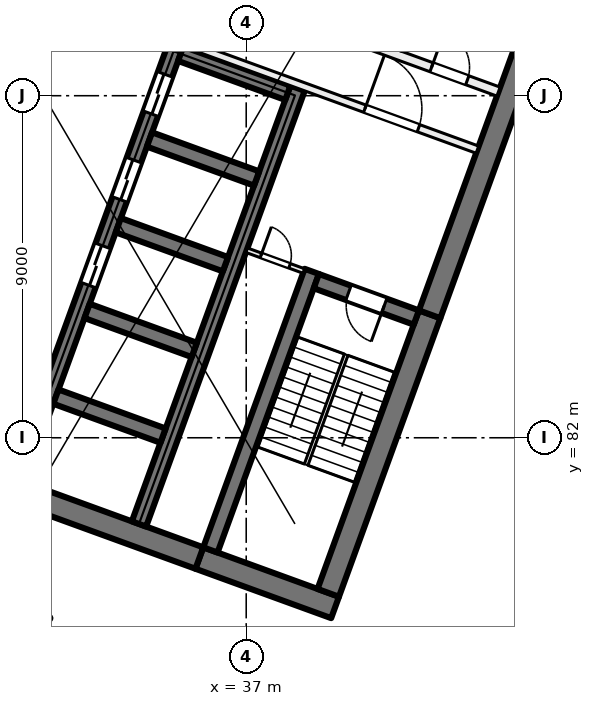
"""IFC4 building model, lengths in metres.
Left out: names, types, materials, properties, quantities, classifications, styles, units other than length and angle.
Written with IfcOpenShell. Run it as: python <this file> out.ifc"""

import sys

from ifc_helpers import new_model, si_unit, direction, frame, frame_2d, origin, place, context, subcontext, project, spatial, rectangle, extrude, element, fill, save


model = new_model("IFC4")
c1 = context("Model", 3, precision=1e-05, world=origin(), true_north=direction((0.0, 1.0)))
c2 = subcontext(c1, "Body", "Model", "MODEL_VIEW")
j1 = project(units=[si_unit("LENGTHUNIT", "METRE"), si_unit("PLANEANGLEUNIT", "RADIAN")], contexts=[c1])
p1 = place(None, origin())
s1 = spatial("IfcSite", under=j1, at=p1, CompositionType="ELEMENT")
p2 = place(p1, origin())
s2 = spatial("IfcBuilding", under=s1, at=p2, CompositionType="ELEMENT")
p3 = place(p2, frame((0.0, 0.0, 121.0)))
s3 = spatial("IfcBuildingStorey", under=s2, at=p3, CompositionType="ELEMENT", Elevation=121.0)
p4 = place(p3, frame((39.338, 77.535, 0.0), z_axis=(0.0, 0.0, 1.0), x_axis=(-0.939701471648, 0.341995824804, 0.0)))
e1 = element("IfcWall", 1, at=p4, inside=s3, PredefinedType="SHEAR", context=c2, shape_type="SweptSolid", body=[
    extrude(rectangle(XDim=3.8, YDim=0.6, at=frame_2d((1.9, 0.0))), origin(), (0.0, 0.0, 1.0), 4.0),
])
p5 = place(p3, frame((35.767, 78.835, 0.0), z_axis=(0.0, 0.0, 1.0), x_axis=(-0.939692894512, 0.342019391267, 0.0)))
e2 = element("IfcWall", 2, at=p5, inside=s3, PredefinedType="SHEAR", context=c2, shape_type="SweptSolid", body=[
    extrude(rectangle(XDim=14.4, YDim=0.6, at=frame_2d((7.2, 0.0))), origin(), (0.0, 0.0, 1.0), 4.0),
])
p6 = place(p3, frame((39.159, 77.92, 0.0), z_axis=(0.0, 0.0, 1.0), x_axis=(0.342016982193, 0.939693771338, 0.0)))
e3 = element("IfcWall", 3, at=p6, inside=s3, PredefinedType="SHEAR", context=c2, shape_type="SweptSolid", body=[
    extrude(rectangle(XDim=7.8, YDim=0.6, at=frame_2d((3.9, 0.0))), origin(), (0.0, 0.0, 1.0), 4.0),
])
p7 = place(p3, frame((41.827, 85.249, 0.0), z_axis=(0.0, 0.0, 1.0), x_axis=(0.342017595281, 0.939693548195, 0.0)))
e4 = element("IfcWall", 4, at=p7, inside=s3, PredefinedType="SHEAR", context=c2, shape_type="SweptSolid", body=[
    extrude(rectangle(XDim=8.925, YDim=0.6, at=frame_2d((4.462, 0.0))), origin(), (0.0, 0.0, 1.0), 4.0),
])
p8 = place(p3, frame((36.058, 79.048, 0.0), z_axis=(0.0, 0.0, 1.0), x_axis=(0.342016982193, 0.939693771338, 0.0)))
e5 = element("IfcWall", 5, at=p8, inside=s3, PredefinedType="SHEAR", context=c2, shape_type="SweptSolid", body=[
    extrude(rectangle(XDim=7.8, YDim=0.4, at=frame_2d((3.9, 0.0))), origin(), (0.0, 0.0, 1.0), 4.0),
])
p9 = place(p3, frame((41.476, 85.164, 0.0), z_axis=(0.0, 0.0, 1.0), x_axis=(-0.939678810556, 0.342058084236, 0.0)))
e6 = element("IfcWall", 6, at=p9, inside=s3, PredefinedType="SHEAR", context=c2, shape_type="SweptSolid", body=[
    extrude(rectangle(XDim=2.8, YDim=0.4, at=frame_2d((1.4, 0.0))), origin(), (0.0, 0.0, 1.0), 4.0),
])
p10 = place(p9, frame((0.9, 0.0, 0.0)))
e7 = element("IfcOpeningElement", 7, at=p10, cuts=e6, PredefinedType="OPENING", context=c2, shape_type="SweptSolid", body=[
    extrude(rectangle(XDim=1.0, YDim=2.1, at=frame_2d((0.5, 1.05))), frame((0.0, 0.21, 0.0), z_axis=(0.0, -1.0, 0.0), x_axis=(1.0, 0.0, 0.0)), (0.0, 0.0, 1.0), 0.42),
])
p11 = place(p3, frame((30.984, 80.895, 0.0), z_axis=(0.0, 0.0, 1.0), x_axis=(0.342021021735, 0.939692301071, 0.0)))
e8 = element("IfcWall", 8, at=p11, inside=s3, PredefinedType="SHEAR", context=c2, shape_type="SweptSolid", body=[
    extrude(rectangle(XDim=12.2, YDim=0.4, at=frame_2d((6.1, 0.0))), origin(), (0.0, 0.0, 1.0), 4.0),
])
p12 = place(p11, frame((5.45, 0.0, 0.0)))
e9 = element("IfcOpeningElement", 9, at=p12, cuts=e8, PredefinedType="OPENING", context=c2, shape_type="SweptSolid", body=[
    extrude(rectangle(XDim=1.1, YDim=2.1, at=frame_2d((0.55, 1.05))), frame((0.0, 0.21, 0.0), z_axis=(0.0, -1.0, 0.0), x_axis=(1.0, 0.0, 0.0)), (0.0, 0.0, 1.0), 0.42),
])
p13 = place(p11, frame((7.85, 0.0, 0.0)))
e10 = element("IfcOpeningElement", 10, at=p13, cuts=e8, PredefinedType="OPENING", context=c2, shape_type="SweptSolid", body=[
    extrude(rectangle(XDim=1.1, YDim=2.1, at=frame_2d((0.55, 1.05))), frame((0.0, 0.21, 0.0), z_axis=(0.0, -1.0, 0.0), x_axis=(1.0, 0.0, 0.0)), (0.0, 0.0, 1.0), 0.42),
])
p14 = place(p11, frame((10.25, 0.0, 0.0)))
e11 = element("IfcOpeningElement", 11, at=p14, cuts=e8, PredefinedType="OPENING", context=c2, shape_type="SweptSolid", body=[
    extrude(rectangle(XDim=1.1, YDim=2.1, at=frame_2d((0.55, 1.05))), frame((0.0, 0.21, 0.0), z_axis=(0.0, -1.0, 0.0), x_axis=(1.0, 0.0, 0.0)), (0.0, 0.0, 1.0), 0.42),
])
p15 = place(p3, frame((34.178, 79.732, 0.0), z_axis=(0.0, 0.0, 1.0), x_axis=(0.342014590177, 0.939694641948, 0.0)))
e12 = element("IfcWall", 12, at=p15, inside=s3, PredefinedType="SHEAR", context=c2, shape_type="SweptSolid", body=[
    extrude(rectangle(XDim=12.2, YDim=0.4, at=frame_2d((6.1, 0.0))), origin(), (0.0, 0.0, 1.0), 4.0),
])
for number, where, z_axis, x_axis in (
    (13, (34.812, 82.056, 0.0), (0.0, 0.0, 1.0), (-0.94, 0.342, 0.0)),
    (14, (35.632, 84.311, 0.0), (0.0, 0.0, 1.0), (-0.94, 0.342, 0.0)),
    (15, (36.453, 86.566, 0.0), (0.0, 0.0, 1.0), (-0.94, 0.342, 0.0)),
    (16, (37.274, 88.822, 0.0), (0.0, 0.0, 1.0), (-0.94, 0.342, 0.0)),
):
    element("IfcWall", number, at=place(p3, frame(where, z_axis=z_axis, x_axis=x_axis)), inside=s3, PredefinedType="SHEAR", context=c2, shape_type="SweptSolid", body=[
        extrude(rectangle(XDim=3.0, YDim=0.4, at=frame_2d((1.5, 0.0))), origin(), (0.0, 0.0, 1.0), 4.0),
    ])
p16 = place(p3, frame((38.095, 91.077, 0.0), z_axis=(0.0, 0.0, 1.0), x_axis=(-0.939676934218, 0.342063238742, 0.0)))
e17 = element("IfcWall", 17, at=p16, inside=s3, PredefinedType="SHEAR", context=c2, shape_type="SweptSolid", body=[
    extrude(rectangle(XDim=3.0, YDim=0.4, at=frame_2d((1.5, 0.0))), origin(), (0.0, 0.0, 1.0), 4.0),
])
p17 = place(p3, frame((35.19, 92.453, 0.0), z_axis=(0.0, 0.0, 1.0), x_axis=(0.939691552312, -0.342023078919, 0.0)))
e18 = element("IfcWall", 18, at=p17, inside=s3, PredefinedType="PARTITIONING", context=c2, shape_type="SweptSolid", body=[
    extrude(rectangle(XDim=8.4, YDim=0.2, at=frame_2d((4.2, 0.0))), origin(), (0.0, 0.0, 1.0), 3.625),
])
p18 = place(p17, frame((5.25, 0.0, 0.0)))
e19 = element("IfcOpeningElement", 19, at=p18, cuts=e18, PredefinedType="OPENING", context=c2, shape_type="SweptSolid", body=[
    extrude(rectangle(XDim=1.5, YDim=2.1, at=frame_2d((0.75, 1.05))), frame((0.0, 0.11, 0.0), z_axis=(0.0, -1.0, 0.0), x_axis=(1.0, 0.0, 0.0)), (0.0, 0.0, 1.0), 0.22),
])
p19 = place(p3, frame((35.746, 93.98, 0.0), z_axis=(0.0, 0.0, 1.0), x_axis=(0.939691552312, -0.342023078919, 0.0)))
e20 = element("IfcWall", 20, at=p19, inside=s3, PredefinedType="PARTITIONING", context=c2, shape_type="SweptSolid", body=[
    extrude(rectangle(XDim=8.4, YDim=0.25, at=frame_2d((4.2, 0.0))), origin(), (0.0, 0.0, 1.0), 3.625),
])
p20 = place(p19, frame((2.375, 0.0, 0.0)))
e21 = element("IfcOpeningElement", 21, at=p20, cuts=e20, PredefinedType="OPENING", context=c2, shape_type="SweptSolid", body=[
    extrude(rectangle(XDim=0.8, YDim=2.1, at=frame_2d((0.4, 1.05))), frame((0.0, 0.135, 0.0), z_axis=(0.0, -1.0, 0.0), x_axis=(1.0, 0.0, 0.0)), (0.0, 0.0, 1.0), 0.27),
])
p21 = place(p19, frame((6.525, 0.0, 0.0)))
e22 = element("IfcOpeningElement", 22, at=p21, cuts=e20, PredefinedType="OPENING", context=c2, shape_type="SweptSolid", body=[
    extrude(rectangle(XDim=1.0, YDim=2.1, at=frame_2d((0.5, 1.05))), frame((0.0, 0.135, 0.0), z_axis=(0.0, -1.0, 0.0), x_axis=(1.0, 0.0, 0.0)), (0.0, 0.0, 1.0), 0.27),
])
p22 = place(p3, frame((37.013, 86.935, 0.0), z_axis=(0.0, 0.0, 1.0), x_axis=(0.939659694648, -0.342110593602, 0.0)))
e23 = element("IfcWall", 23, at=p22, inside=s3, PredefinedType="PARTITIONING", context=c2, shape_type="SweptSolid", body=[
    extrude(rectangle(XDim=1.6, YDim=0.125, at=frame_2d((0.8, 0.0))), origin(), (0.0, 0.0, 1.0), 3.625),
])
p23 = place(p22, frame((0.4, 0.0, 0.0)))
e24 = element("IfcOpeningElement", 24, at=p23, cuts=e23, PredefinedType="OPENING", context=c2, shape_type="SweptSolid", body=[
    extrude(rectangle(XDim=0.8, YDim=2.1, at=frame_2d((0.4, 1.05))), frame((0.0, 0.073, 0.0), z_axis=(0.0, -1.0, 0.0), x_axis=(1.0, 0.0, 0.0)), (0.0, 0.0, 1.0), 0.145),
])
p24 = place(p12, origin())
e25 = element("IfcDoor", 25, at=p24, inside=s3, OperationType="DOUBLE_DOOR_SLIDING", PredefinedType="DOOR", context=c2, shape_type="SweptSolid", body=[
    extrude(rectangle(XDim=1.1, YDim=2.1, at=frame_2d((0.55, 1.05))), frame((0.0, 0.025, 0.0), z_axis=(0.0, -1.0, 0.0), x_axis=(1.0, 0.0, 0.0)), (0.0, 0.0, 1.0), 0.05),
])
fill(e9, e25)
p25 = place(p13, origin())
e26 = element("IfcDoor", 26, at=p25, inside=s3, OperationType="DOUBLE_DOOR_SLIDING", PredefinedType="DOOR", context=c2, shape_type="SweptSolid", body=[
    extrude(rectangle(XDim=1.1, YDim=2.1, at=frame_2d((0.55, 1.05))), frame((0.0, 0.025, 0.0), z_axis=(0.0, -1.0, 0.0), x_axis=(1.0, 0.0, 0.0)), (0.0, 0.0, 1.0), 0.05),
])
fill(e10, e26)
p26 = place(p14, origin())
e27 = element("IfcDoor", 27, at=p26, inside=s3, OperationType="DOUBLE_DOOR_SLIDING", PredefinedType="DOOR", context=c2, shape_type="SweptSolid", body=[
    extrude(rectangle(XDim=1.1, YDim=2.1, at=frame_2d((0.55, 1.05))), frame((0.0, 0.025, 0.0), z_axis=(0.0, -1.0, 0.0), x_axis=(1.0, 0.0, 0.0)), (0.0, 0.0, 1.0), 0.05),
])
fill(e11, e27)
p27 = place(p18, origin())
e28 = element("IfcDoor", 28, at=p27, inside=s3, OperationType="DOUBLE_DOOR_SINGLE_SWING", PredefinedType="DOOR", context=c2, shape_type="SweptSolid", body=[
    extrude(rectangle(XDim=1.5, YDim=2.1, at=frame_2d((0.75, 1.05))), frame((0.0, 0.025, 0.0), z_axis=(0.0, -1.0, 0.0), x_axis=(1.0, 0.0, 0.0)), (0.0, 0.0, 1.0), 0.05),
])
fill(e19, e28)
p28 = place(p10, origin())
e29 = element("IfcDoor", 29, at=p28, inside=s3, OperationType="SINGLE_SWING_RIGHT", PredefinedType="DOOR", context=c2, shape_type="SweptSolid", body=[
    extrude(rectangle(XDim=1.0, YDim=2.1, at=frame_2d((0.5, 1.05))), frame((0.0, 0.025, 0.0), z_axis=(0.0, -1.0, 0.0), x_axis=(1.0, 0.0, 0.0)), (0.0, 0.0, 1.0), 0.05),
])
fill(e7, e29)
p29 = place(p23, origin())
e30 = element("IfcDoor", 30, at=p29, inside=s3, OperationType="SINGLE_SWING_LEFT", PredefinedType="DOOR", context=c2, shape_type="SweptSolid", body=[
    extrude(rectangle(XDim=0.8, YDim=2.1, at=frame_2d((0.4, 1.05))), frame((0.0, 0.025, 0.0), z_axis=(0.0, -1.0, 0.0), x_axis=(1.0, 0.0, 0.0)), (0.0, 0.0, 1.0), 0.05),
])
fill(e24, e30)
p30 = place(p21, origin())
e31 = element("IfcDoor", 31, at=p30, inside=s3, OperationType="SINGLE_SWING_LEFT", PredefinedType="DOOR", context=c2, shape_type="SweptSolid", body=[
    extrude(rectangle(XDim=1.0, YDim=2.1, at=frame_2d((0.5, 1.05))), frame((0.0, 0.025, 0.0), z_axis=(0.0, -1.0, 0.0), x_axis=(1.0, 0.0, 0.0)), (0.0, 0.0, 1.0), 0.05),
])
fill(e22, e31)
save(model, sys.argv[1])
